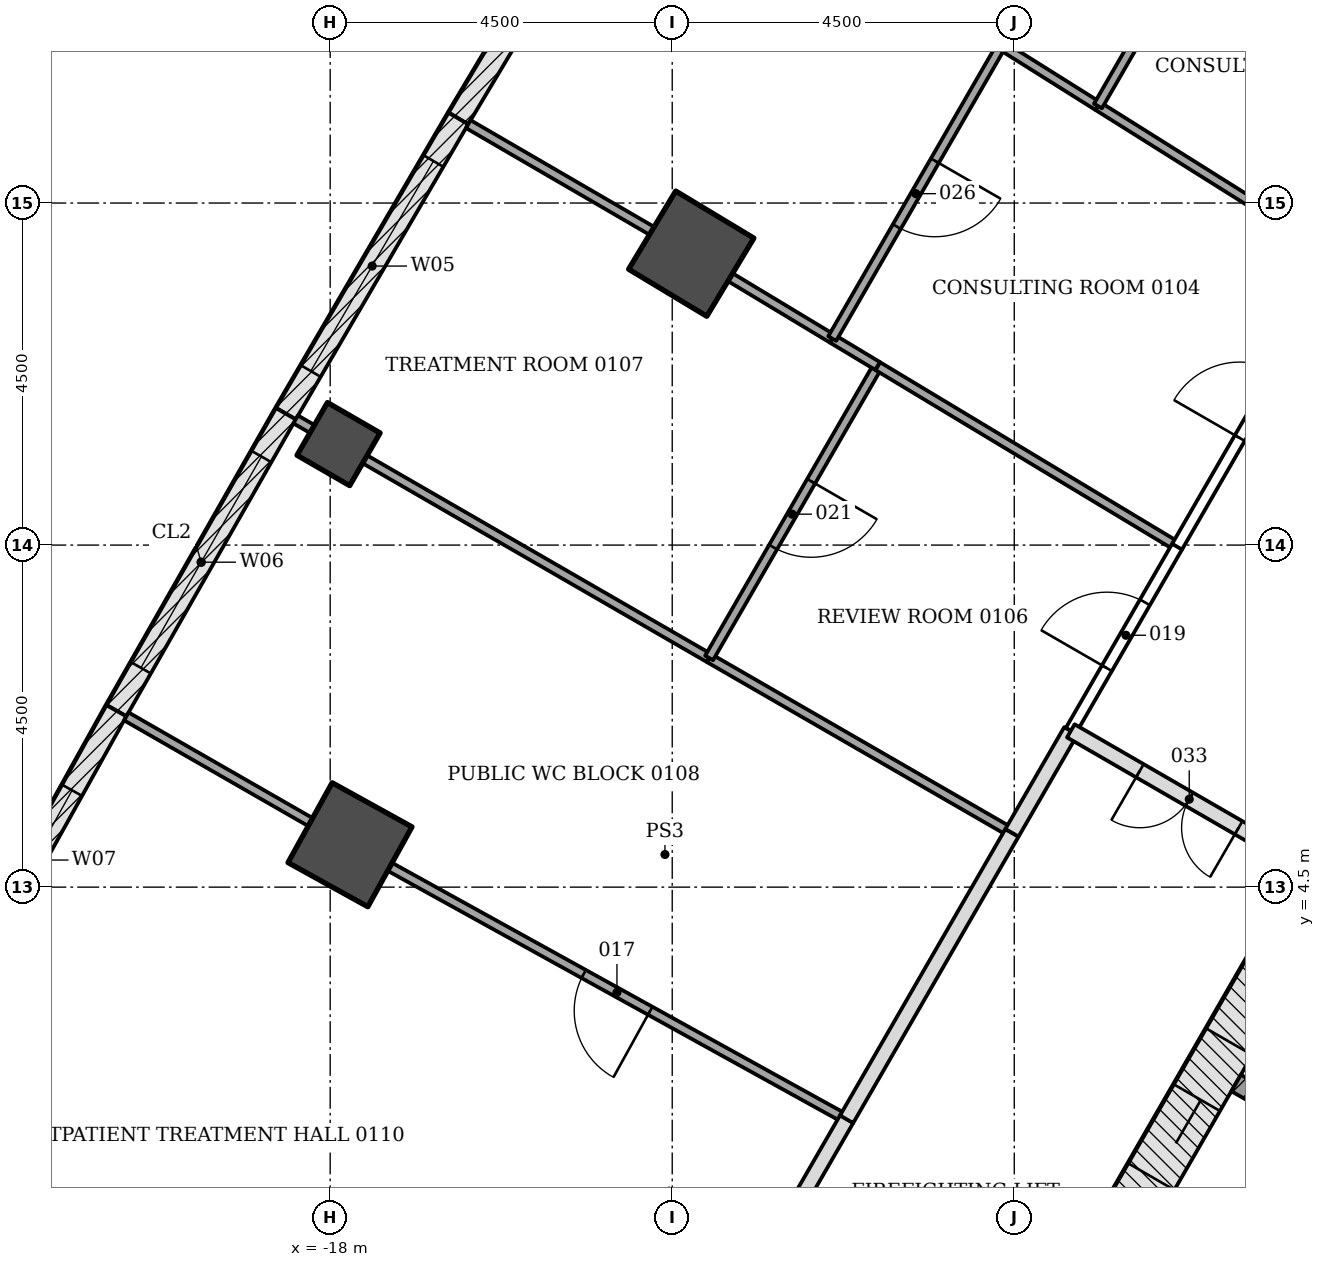
"""IFC4 building model, lengths in metres.
Left out: names, types, materials, properties, quantities, classifications, styles, units other than length and angle.
Written with IfcOpenShell. Run it as: python <this file> out.ifc"""

import sys

from ifc_helpers import new_model, si_unit, direction, frame, frame_2d, origin, origin_2d, place, context, subcontext, project, spatial, rectangle, extrude, element, fill, save


model = new_model("IFC4")
c1 = context("Model", 3, precision=1e-05, world=origin(), true_north=direction((0.0, 1.0)))
c2 = subcontext(c1, "Body", "Model", "MODEL_VIEW")
j1 = project(units=[si_unit("LENGTHUNIT", "METRE"), si_unit("PLANEANGLEUNIT", "RADIAN")], contexts=[c1])
p1 = place(None, origin())
s1 = spatial("IfcSite", under=j1, at=p1, CompositionType="ELEMENT")
p2 = place(p1, origin())
s2 = spatial("IfcBuilding", under=s1, at=p2, CompositionType="ELEMENT")
p3 = place(p2, frame((0.0, 0.0, 6.0)))
s3 = spatial("IfcBuildingStorey", under=s2, at=p3, CompositionType="ELEMENT", Elevation=6.0)
for number, where, z_axis, x_axis in (
    (1, (-13.25, 12.834, -0.25), (0.0, 0.0, 1.0), (-0.857, 0.516, 0.0)),
    (2, (-17.739, 5.058, -0.25), (0.0, 0.0, 1.0), (-0.875, 0.484, 0.0)),
):
    element("IfcColumn", number, at=place(p3, frame(where, z_axis=z_axis, x_axis=x_axis)), inside=s3, PredefinedType="COLUMN", context=c2, shape_type="SweptSolid", body=[
        extrude(rectangle(XDim=1.2, YDim=1.2, at=origin_2d()), origin(), (0.0, 0.0, 1.0), 4.5),
    ])
p4 = place(p3, frame((-17.89, 10.329, -0.25), z_axis=(0.0, 0.0, 1.0), x_axis=(-0.866025403784, 0.5, 0.0)))
e3 = element("IfcColumn", 3, at=p4, inside=s3, PredefinedType="COLUMN", context=c2, shape_type="SweptSolid", body=[
    extrude(rectangle(XDim=0.8, YDim=0.8, at=origin_2d()), origin(), (0.0, 0.0, 1.0), 4.5),
])
p5 = place(p3, frame((-1.083, 11.281, -0.25), z_axis=(0.0, 0.0, 1.0), x_axis=(-0.500001446645, -0.866024568562, 0.0)))
e4 = element("IfcWall", 4, at=p5, inside=s3, PredefinedType="SHEAR", context=c2, shape_type="SweptSolid", body=[
    extrude(rectangle(XDim=18.458, YDim=0.7, at=frame_2d((9.229, 0.0))), origin(), (0.0, 0.0, 1.0), 4.5),
])
p6 = place(p5, frame((8.979, 0.0, 0.25)))
e5 = element("IfcOpeningElement", 5, at=p6, cuts=e4, PredefinedType="OPENING", context=c2, shape_type="SweptSolid", body=[
    extrude(rectangle(XDim=1.2, YDim=2.1, at=frame_2d((0.6, 1.05))), frame((0.0, 0.36, 0.0), z_axis=(0.0, -1.0, 0.0), x_axis=(1.0, 0.0, 0.0)), (0.0, 0.0, 1.0), 0.72),
])
p7 = place(p5, frame((11.029, 0.0, 0.25)))
e6 = element("IfcOpeningElement", 6, at=p7, cuts=e4, PredefinedType="OPENING", context=c2, shape_type="SweptSolid", body=[
    extrude(rectangle(XDim=1.2, YDim=2.1, at=frame_2d((0.6, 1.05))), frame((0.0, 0.36, 0.0), z_axis=(0.0, -1.0, 0.0), x_axis=(1.0, 0.0, 0.0)), (0.0, 0.0, 1.0), 0.72),
])
p8 = place(p3, frame((-16.313, 14.614, 0.0), z_axis=(0.0, 0.0, 1.0), x_axis=(0.513257465408, 0.858234684805, 0.0)))
e7 = element("IfcWall", 7, at=p8, inside=s3, PredefinedType="NOTDEFINED", context=c2, shape_type="SweptSolid", body=[
    extrude(rectangle(XDim=4.496, YDim=0.3, at=frame_2d((2.248, 0.0))), origin(), (0.0, 0.0, 1.0), 4.25),
])
p9 = place(p8, frame((1.198, 0.0, 0.8)))
e8 = element("IfcOpeningElement", 8, at=p9, cuts=e7, PredefinedType="OPENING", context=c2, shape_type="SweptSolid", body=[
    extrude(rectangle(XDim=2.1, YDim=3.0, at=frame_2d((1.05, 1.5))), frame((0.0, 0.16, 0.0), z_axis=(0.0, -1.0, 0.0), x_axis=(1.0, 0.0, 0.0)), (0.0, 0.0, 1.0), 0.32),
])
p10 = place(p3, frame((-18.582, 10.73, 0.0), z_axis=(0.0, 0.0, 1.0), x_axis=(0.50445499627, 0.86343798662, 0.0)))
e9 = element("IfcWall", 9, at=p10, inside=s3, PredefinedType="NOTDEFINED", context=c2, shape_type="SweptSolid", body=[
    extrude(rectangle(XDim=4.496, YDim=0.3, at=frame_2d((2.248, 0.0))), origin(), (0.0, 0.0, 1.0), 4.25),
])
p11 = place(p10, frame((0.648, 0.0, 0.8)))
e10 = element("IfcOpeningElement", 10, at=p11, cuts=e9, PredefinedType="OPENING", context=c2, shape_type="SweptSolid", body=[
    extrude(rectangle(XDim=3.2, YDim=2.7, at=frame_2d((1.6, 1.35))), frame((0.0, 0.16, 0.0), z_axis=(0.0, -1.0, 0.0), x_axis=(1.0, 0.0, 0.0)), (0.0, 0.0, 1.0), 0.32),
])
p12 = place(p3, frame((-20.811, 6.823, 0.0), z_axis=(0.0, 0.0, 1.0), x_axis=(0.495524760411, 0.868593812907, 0.0)))
e11 = element("IfcWall", 11, at=p12, inside=s3, PredefinedType="NOTDEFINED", context=c2, shape_type="SweptSolid", body=[
    extrude(rectangle(XDim=4.496, YDim=0.3, at=frame_2d((2.248, 0.0))), origin(), (0.0, 0.0, 1.0), 4.25),
])
p13 = place(p12, frame((0.648, 0.0, 0.8)))
e12 = element("IfcOpeningElement", 12, at=p13, cuts=e11, PredefinedType="OPENING", context=c2, shape_type="SweptSolid", body=[
    extrude(rectangle(XDim=3.2, YDim=2.7, at=frame_2d((1.6, 1.35))), frame((0.0, 0.16, 0.0), z_axis=(0.0, -1.0, 0.0), x_axis=(1.0, 0.0, 0.0)), (0.0, 0.0, 1.0), 0.32),
])
p14 = place(p3, frame((-23.0, 2.893, 0.0), z_axis=(0.0, 0.0, 1.0), x_axis=(0.486606252415, 0.873621402617, 0.0)))
e13 = element("IfcWall", 13, at=p14, inside=s3, PredefinedType="NOTDEFINED", context=c2, shape_type="SweptSolid", body=[
    extrude(rectangle(XDim=4.496, YDim=0.3, at=frame_2d((2.248, 0.0))), origin(), (0.0, 0.0, 1.0), 4.25),
])
p15 = place(p14, frame((1.198, 0.0, 0.8)))
e14 = element("IfcOpeningElement", 14, at=p15, cuts=e13, PredefinedType="OPENING", context=c2, shape_type="SweptSolid", body=[
    extrude(rectangle(XDim=2.1, YDim=3.0, at=frame_2d((1.05, 1.5))), frame((0.0, 0.16, 0.0), z_axis=(0.0, -1.0, 0.0), x_axis=(1.0, 0.0, 0.0)), (0.0, 0.0, 1.0), 0.32),
])
p16 = place(p3, frame((-6.081, 1.923, -0.25), z_axis=(0.0, 0.0, 1.0), x_axis=(0.866032775405, -0.499987231761, 0.0)))
e15 = element("IfcWall", 15, at=p16, inside=s3, PredefinedType="PARTITIONING", context=c2, shape_type="SweptSolid", body=[
    extrude(rectangle(XDim=2.9, YDim=0.25, at=frame_2d((1.45, 0.0))), origin(), (0.0, 0.0, 1.0), 4.5),
])
p17 = place(p3, frame((-12.635, -1.028, 0.0), z_axis=(0.0, 0.0, 1.0), x_axis=(0.50005725472, 0.865992345233, 0.0)))
e16 = element("IfcWall", 16, at=p17, inside=s3, PredefinedType="PARTITIONING", context=c2, shape_type="SweptSolid", body=[
    extrude(rectangle(XDim=2.862, YDim=0.2, at=frame_2d((1.431, 0.0))), origin(), (0.0, 0.0, 1.0), 3.638),
])
p18 = place(p3, frame((-18.26, 5.356, 0.0), z_axis=(0.0, 0.0, 1.0), x_axis=(-0.867283853893, 0.49781393791, 0.0)))
e17 = element("IfcWall", 17, at=p18, inside=s3, PredefinedType="PARTITIONING", context=c2, shape_type="SweptSolid", body=[
    extrude(rectangle(XDim=2.792, YDim=0.12, at=frame_2d((1.396, 0.0))), origin(), (0.0, 0.0, 1.0), 3.633),
])
p19 = place(p3, frame((-11.208, 1.446, 0.0), z_axis=(0.0, 0.0, 1.0), x_axis=(-0.875125393946, 0.483896212912, 0.0)))
e18 = element("IfcWall", 18, at=p19, inside=s3, PredefinedType="PARTITIONING", context=c2, shape_type="SweptSolid", body=[
    extrude(rectangle(XDim=6.863, YDim=0.12, at=frame_2d((3.432, 0.0))), origin(), (0.0, 0.0, 1.0), 3.638),
])
p20 = place(p19, frame((2.95, 0.0, 0.0)))
e19 = element("IfcOpeningElement", 19, at=p20, cuts=e18, PredefinedType="OPENING", context=c2, shape_type="SweptSolid", body=[
    extrude(rectangle(XDim=1.0, YDim=2.1, at=frame_2d((0.5, 1.05))), frame((0.0, 0.07, 0.0), z_axis=(0.0, -1.0, 0.0), x_axis=(1.0, 0.0, 0.0)), (0.0, 0.0, 1.0), 0.14),
])
p21 = place(p3, frame((-9.031, 5.213, 0.0), z_axis=(0.0, 0.0, 1.0), x_axis=(-0.500044734646, -0.865999574684, 0.0)))
e20 = element("IfcWall", 20, at=p21, inside=s3, PredefinedType="PARTITIONING", context=c2, shape_type="SweptSolid", body=[
    extrude(rectangle(XDim=4.35, YDim=0.2, at=frame_2d((2.175, 0.0))), origin(), (0.0, 0.0, 1.0), 3.638),
])
p22 = place(p3, frame((-8.256, 6.555, 0.0), z_axis=(0.0, 0.0, 1.0), x_axis=(-0.500177701192, -0.865922783642, 0.0)))
e21 = element("IfcWall", 21, at=p22, inside=s3, PredefinedType="PARTITIONING", context=c2, shape_type="SweptSolid", body=[
    extrude(rectangle(XDim=1.547, YDim=0.2, at=frame_2d((0.774, 0.0))), origin(), (0.0, 0.0, 1.0), 3.638),
])
p23 = place(p3, frame((-5.226, 4.806, 0.0), z_axis=(0.0, 0.0, 1.0), x_axis=(-0.865949687125, 0.500131122175, 0.0)))
e22 = element("IfcWall", 22, at=p23, inside=s3, PredefinedType="PARTITIONING", context=c2, shape_type="SweptSolid", body=[
    extrude(rectangle(XDim=3.499, YDim=0.2, at=frame_2d((1.75, 0.0))), origin(), (0.0, 0.0, 1.0), 4.25),
])
p24 = place(p23, frame((0.95, 0.0, 0.0)))
e23 = element("IfcOpeningElement", 23, at=p24, cuts=e22, PredefinedType="OPENING", context=c2, shape_type="SweptSolid", body=[
    extrude(rectangle(XDim=1.5, YDim=2.1, at=frame_2d((0.75, 1.05))), frame((0.0, 0.11, 0.0), z_axis=(0.0, -1.0, 0.0), x_axis=(1.0, 0.0, 0.0)), (0.0, 0.0, 1.0), 0.22),
])
p25 = place(p3, frame((-9.032, 5.215, 0.0), z_axis=(0.0, 0.0, 1.0), x_axis=(-0.866130767322, 0.499817460578, 0.0)))
e24 = element("IfcWall", 24, at=p25, inside=s3, PredefinedType="PARTITIONING", context=c2, shape_type="SweptSolid", body=[
    extrude(rectangle(XDim=4.597, YDim=0.12, at=frame_2d((2.299, 0.0))), origin(), (0.0, 0.0, 1.0), 3.638),
])
p26 = place(p3, frame((-18.237, 10.528, 0.0), z_axis=(0.0, 0.0, 1.0), x_axis=(-0.866558586415, 0.499075361355, 0.0)))
e25 = element("IfcWall", 25, at=p26, inside=s3, PredefinedType="PARTITIONING", context=c2, shape_type="SweptSolid", body=[
    extrude(rectangle(XDim=0.25, YDim=0.12, at=frame_2d((0.125, 0.0))), origin(), (0.0, 0.0, 1.0), 4.25),
])
p27 = place(p3, frame((-13.017, 7.515, 0.0), z_axis=(0.0, 0.0, 1.0), x_axis=(-0.866023771128, 0.500002827834, 0.0)))
e26 = element("IfcWall", 26, at=p27, inside=s3, PredefinedType="PARTITIONING", context=c2, shape_type="SweptSolid", body=[
    extrude(rectangle(XDim=5.226, YDim=0.12, at=frame_2d((2.613, 0.0))), origin(), (0.0, 0.0, 1.0), 3.638),
])
p28 = place(p3, frame((-10.797, 11.355, 0.0), z_axis=(0.0, 0.0, 1.0), x_axis=(-0.500117989508, -0.865957271793, 0.0)))
e27 = element("IfcWall", 27, at=p28, inside=s3, PredefinedType="PARTITIONING", context=c2, shape_type="SweptSolid", body=[
    extrude(rectangle(XDim=4.435, YDim=0.12, at=frame_2d((2.217, 0.0))), origin(), (0.0, 0.0, 1.0), 3.638),
])
p29 = place(p28, frame((1.75, 0.0, 0.0)))
e28 = element("IfcOpeningElement", 28, at=p29, cuts=e27, PredefinedType="OPENING", context=c2, shape_type="SweptSolid", body=[
    extrude(rectangle(XDim=1.0, YDim=2.1, at=frame_2d((0.5, 1.05))), frame((0.0, 0.07, 0.0), z_axis=(0.0, -1.0, 0.0), x_axis=(1.0, 0.0, 0.0)), (0.0, 0.0, 1.0), 0.14),
])
p30 = place(p3, frame((-6.857, 8.983, 0.0), z_axis=(0.0, 0.0, 1.0), x_axis=(-0.856751730158, 0.515729069251, 0.0)))
e29 = element("IfcWall", 29, at=p30, inside=s3, PredefinedType="PARTITIONING", context=c2, shape_type="SweptSolid", body=[
    extrude(rectangle(XDim=4.598, YDim=0.12, at=frame_2d((2.299, 0.0))), origin(), (0.0, 0.0, 1.0), 3.638),
])
p31 = place(p3, frame((-8.256, 6.558, 0.0), z_axis=(0.0, 0.0, 1.0), x_axis=(0.500081734942, 0.86597820895, 0.0)))
e30 = element("IfcWall", 30, at=p31, inside=s3, PredefinedType="PARTITIONING", context=c2, shape_type="SweptSolid", body=[
    extrude(rectangle(XDim=2.804, YDim=0.15, at=frame_2d((1.402, 0.0))), origin(), (0.0, 0.0, 1.0), 3.638),
])
p32 = place(p31, frame((0.95, 0.0, 0.0)))
e31 = element("IfcOpeningElement", 31, at=p32, cuts=e30, PredefinedType="OPENING", context=c2, shape_type="SweptSolid", body=[
    extrude(rectangle(XDim=1.0, YDim=2.1, at=frame_2d((0.5, 1.05))), frame((0.0, 0.085, 0.0), z_axis=(0.0, -1.0, 0.0), x_axis=(1.0, 0.0, 0.0)), (0.0, 0.0, 1.0), 0.17),
])
p33 = place(p3, frame((-10.798, 11.356, 0.0), z_axis=(0.0, 0.0, 1.0), x_axis=(-0.856627537291, 0.515935327686, 0.0)))
e32 = element("IfcWall", 32, at=p33, inside=s3, PredefinedType="PARTITIONING", context=c2, shape_type="SweptSolid", body=[
    extrude(rectangle(XDim=0.698, YDim=0.12, at=frame_2d((0.349, 0.0))), origin(), (0.0, 0.0, 1.0), 3.638),
])
p34 = place(p3, frame((-13.769, 13.135, 0.0), z_axis=(0.0, 0.0, 1.0), x_axis=(-0.864576979504, 0.50250039454, 0.0)))
e33 = element("IfcWall", 33, at=p34, inside=s3, PredefinedType="PARTITIONING", context=c2, shape_type="SweptSolid", body=[
    extrude(rectangle(XDim=2.792, YDim=0.12, at=frame_2d((1.396, 0.0))), origin(), (0.0, 0.0, 1.0), 3.633),
])
p35 = place(p3, frame((-11.397, 11.717, 0.0), z_axis=(0.0, 0.0, 1.0), x_axis=(-0.85652691333, 0.516102360721, 0.0)))
e34 = element("IfcWall", 34, at=p35, inside=s3, PredefinedType="PARTITIONING", context=c2, shape_type="SweptSolid", body=[
    extrude(rectangle(XDim=1.563, YDim=0.12, at=frame_2d((0.782, 0.0))), origin(), (0.0, 0.0, 1.0), 3.638),
])
p36 = place(p3, frame((-6.858, 8.979, 0.0), z_axis=(0.0, 0.0, 1.0), x_axis=(0.500105111742, 0.865964708986, 0.0)))
e35 = element("IfcWall", 35, at=p36, inside=s3, PredefinedType="PARTITIONING", context=c2, shape_type="SweptSolid", body=[
    extrude(rectangle(XDim=4.363, YDim=0.15, at=frame_2d((2.181, 0.0))), origin(), (0.0, 0.0, 1.0), 3.638),
])
p37 = place(p36, frame((1.65, 0.0, 0.0)))
e36 = element("IfcOpeningElement", 36, at=p37, cuts=e35, PredefinedType="OPENING", context=c2, shape_type="SweptSolid", body=[
    extrude(rectangle(XDim=1.0, YDim=2.1, at=frame_2d((0.5, 1.05))), frame((0.0, 0.085, 0.0), z_axis=(0.0, -1.0, 0.0), x_axis=(1.0, 0.0, 0.0)), (0.0, 0.0, 1.0), 0.17),
])
p38 = place(p3, frame((-9.17, 15.572, 0.0), z_axis=(0.0, 0.0, 1.0), x_axis=(-0.499902881486, -0.866081467924, 0.0)))
e37 = element("IfcWall", 37, at=p38, inside=s3, PredefinedType="PARTITIONING", context=c2, shape_type="SweptSolid", body=[
    extrude(rectangle(XDim=4.451, YDim=0.12, at=frame_2d((2.226, 0.0))), origin(), (0.0, 0.0, 1.0), 3.638),
])
p39 = place(p38, frame((1.75, 0.0, 0.0)))
e38 = element("IfcOpeningElement", 38, at=p39, cuts=e37, PredefinedType="OPENING", context=c2, shape_type="SweptSolid", body=[
    extrude(rectangle(XDim=1.0, YDim=2.1, at=frame_2d((0.5, 1.05))), frame((0.0, 0.07, 0.0), z_axis=(0.0, -1.0, 0.0), x_axis=(1.0, 0.0, 0.0)), (0.0, 0.0, 1.0), 0.14),
])
p40 = place(p3, frame((-4.68, 12.753, 0.0), z_axis=(0.0, 0.0, 1.0), x_axis=(-0.846844902979, 0.531839929206, 0.0)))
e39 = element("IfcWall", 39, at=p40, inside=s3, PredefinedType="PARTITIONING", context=c2, shape_type="SweptSolid", body=[
    extrude(rectangle(XDim=3.8, YDim=0.12, at=frame_2d((1.9, 0.0))), origin(), (0.0, 0.0, 1.0), 3.638),
])
p41 = place(p3, frame((-7.901, 14.776, 0.0), z_axis=(0.0, 0.0, 1.0), x_axis=(-0.847002237732, 0.531589323892, 0.0)))
e40 = element("IfcWall", 40, at=p41, inside=s3, PredefinedType="PARTITIONING", context=c2, shape_type="SweptSolid", body=[
    extrude(rectangle(XDim=1.503, YDim=0.12, at=frame_2d((0.751, 0.0))), origin(), (0.0, 0.0, 1.0), 3.638),
])
p42 = place(p3, frame((-5.684, 18.611, 0.0), z_axis=(0.0, 0.0, 1.0), x_axis=(-0.500099413844, -0.865967999567, 0.0)))
e41 = element("IfcWall", 41, at=p42, inside=s3, PredefinedType="PARTITIONING", context=c2, shape_type="SweptSolid", body=[
    extrude(rectangle(XDim=4.429, YDim=0.12, at=frame_2d((2.214, 0.0))), origin(), (0.0, 0.0, 1.0), 3.638),
])
p43 = place(p42, frame((1.75, 0.0, 0.0)))
e42 = element("IfcOpeningElement", 42, at=p43, cuts=e41, PredefinedType="OPENING", context=c2, shape_type="SweptSolid", body=[
    extrude(rectangle(XDim=1.0, YDim=2.1, at=frame_2d((0.5, 1.05))), frame((0.0, 0.07, 0.0), z_axis=(0.0, -1.0, 0.0), x_axis=(1.0, 0.0, 0.0)), (0.0, 0.0, 1.0), 0.14),
])
p44 = place(p11, origin())
e43 = element("IfcWindow", 43, at=p44, inside=s3, PartitioningType="TRIPLE_PANEL_VERTICAL", PredefinedType="WINDOW", context=c2, shape_type="SweptSolid", body=[
    extrude(rectangle(XDim=3.2, YDim=2.7, at=frame_2d((1.6, 1.35))), frame((0.0, 0.03, 0.0), z_axis=(0.0, -1.0, 0.0), x_axis=(1.0, 0.0, 0.0)), (0.0, 0.0, 1.0), 0.06),
])
fill(e10, e43)
p45 = place(p13, origin())
e44 = element("IfcWindow", 44, at=p45, inside=s3, PartitioningType="TRIPLE_PANEL_VERTICAL", PredefinedType="WINDOW", context=c2, shape_type="SweptSolid", body=[
    extrude(rectangle(XDim=3.2, YDim=2.7, at=frame_2d((1.6, 1.35))), frame((0.0, 0.03, 0.0), z_axis=(0.0, -1.0, 0.0), x_axis=(1.0, 0.0, 0.0)), (0.0, 0.0, 1.0), 0.06),
])
fill(e12, e44)
p46 = place(p15, origin())
e45 = element("IfcWindow", 45, at=p46, inside=s3, PartitioningType="DOUBLE_PANEL_HORIZONTAL", PredefinedType="WINDOW", context=c2, shape_type="SweptSolid", body=[
    extrude(rectangle(XDim=2.1, YDim=3.0, at=frame_2d((1.05, 1.5))), frame((0.0, 0.03, 0.0), z_axis=(0.0, -1.0, 0.0), x_axis=(1.0, 0.0, 0.0)), (0.0, 0.0, 1.0), 0.06),
])
fill(e14, e45)
p47 = place(p6, origin())
e46 = element("IfcDoor", 46, at=p47, inside=s3, OperationType="DOUBLE_DOOR_SLIDING", PredefinedType="DOOR", context=c2, shape_type="SweptSolid", body=[
    extrude(rectangle(XDim=1.2, YDim=2.1, at=frame_2d((0.6, 1.05))), frame((0.0, 0.025, 0.0), z_axis=(0.0, -1.0, 0.0), x_axis=(1.0, 0.0, 0.0)), (0.0, 0.0, 1.0), 0.05),
])
fill(e5, e46)
p48 = place(p7, origin())
e47 = element("IfcDoor", 47, at=p48, inside=s3, OperationType="DOUBLE_DOOR_SLIDING", PredefinedType="DOOR", context=c2, shape_type="SweptSolid", body=[
    extrude(rectangle(XDim=1.2, YDim=2.1, at=frame_2d((0.6, 1.05))), frame((0.0, 0.025, 0.0), z_axis=(0.0, -1.0, 0.0), x_axis=(1.0, 0.0, 0.0)), (0.0, 0.0, 1.0), 0.05),
])
fill(e6, e47)
p49 = place(p20, origin())
e48 = element("IfcDoor", 48, at=p49, inside=s3, OperationType="SINGLE_SWING_LEFT", PredefinedType="DOOR", context=c2, shape_type="SweptSolid", body=[
    extrude(rectangle(XDim=1.0, YDim=2.1, at=frame_2d((0.5, 1.05))), frame((0.0, 0.025, 0.0), z_axis=(0.0, -1.0, 0.0), x_axis=(1.0, 0.0, 0.0)), (0.0, 0.0, 1.0), 0.05),
])
fill(e19, e48)
p50 = place(p32, origin())
e49 = element("IfcDoor", 49, at=p50, inside=s3, OperationType="SINGLE_SWING_RIGHT", PredefinedType="DOOR", context=c2, shape_type="SweptSolid", body=[
    extrude(rectangle(XDim=1.0, YDim=2.1, at=frame_2d((0.5, 1.05))), frame((0.0, 0.025, 0.0), z_axis=(0.0, -1.0, 0.0), x_axis=(1.0, 0.0, 0.0)), (0.0, 0.0, 1.0), 0.05),
])
fill(e31, e49)
p51 = place(p29, origin())
e50 = element("IfcDoor", 50, at=p51, inside=s3, OperationType="SINGLE_SWING_LEFT", PredefinedType="DOOR", context=c2, shape_type="SweptSolid", body=[
    extrude(rectangle(XDim=1.0, YDim=2.1, at=frame_2d((0.5, 1.05))), frame((0.0, 0.025, 0.0), z_axis=(0.0, -1.0, 0.0), x_axis=(1.0, 0.0, 0.0)), (0.0, 0.0, 1.0), 0.05),
])
fill(e28, e50)
p52 = place(p37, origin())
e51 = element("IfcDoor", 51, at=p52, inside=s3, OperationType="SINGLE_SWING_LEFT", PredefinedType="DOOR", context=c2, shape_type="SweptSolid", body=[
    extrude(rectangle(XDim=1.0, YDim=2.1, at=frame_2d((0.5, 1.05))), frame((0.0, 0.025, 0.0), z_axis=(0.0, -1.0, 0.0), x_axis=(1.0, 0.0, 0.0)), (0.0, 0.0, 1.0), 0.05),
])
fill(e36, e51)
p53 = place(p39, origin())
e52 = element("IfcDoor", 52, at=p53, inside=s3, OperationType="SINGLE_SWING_LEFT", PredefinedType="DOOR", context=c2, shape_type="SweptSolid", body=[
    extrude(rectangle(XDim=1.0, YDim=2.1, at=frame_2d((0.5, 1.05))), frame((0.0, 0.025, 0.0), z_axis=(0.0, -1.0, 0.0), x_axis=(1.0, 0.0, 0.0)), (0.0, 0.0, 1.0), 0.05),
])
fill(e38, e52)
p54 = place(p24, origin())
e53 = element("IfcDoor", 53, at=p54, inside=s3, OperationType="DOUBLE_DOOR_SINGLE_SWING", PredefinedType="DOOR", context=c2, shape_type="SweptSolid", body=[
    extrude(rectangle(XDim=1.5, YDim=2.1, at=frame_2d((0.75, 1.05))), frame((0.0, 0.025, 0.0), z_axis=(0.0, -1.0, 0.0), x_axis=(1.0, 0.0, 0.0)), (0.0, 0.0, 1.0), 0.05),
])
fill(e23, e53)
save(model, sys.argv[1])
